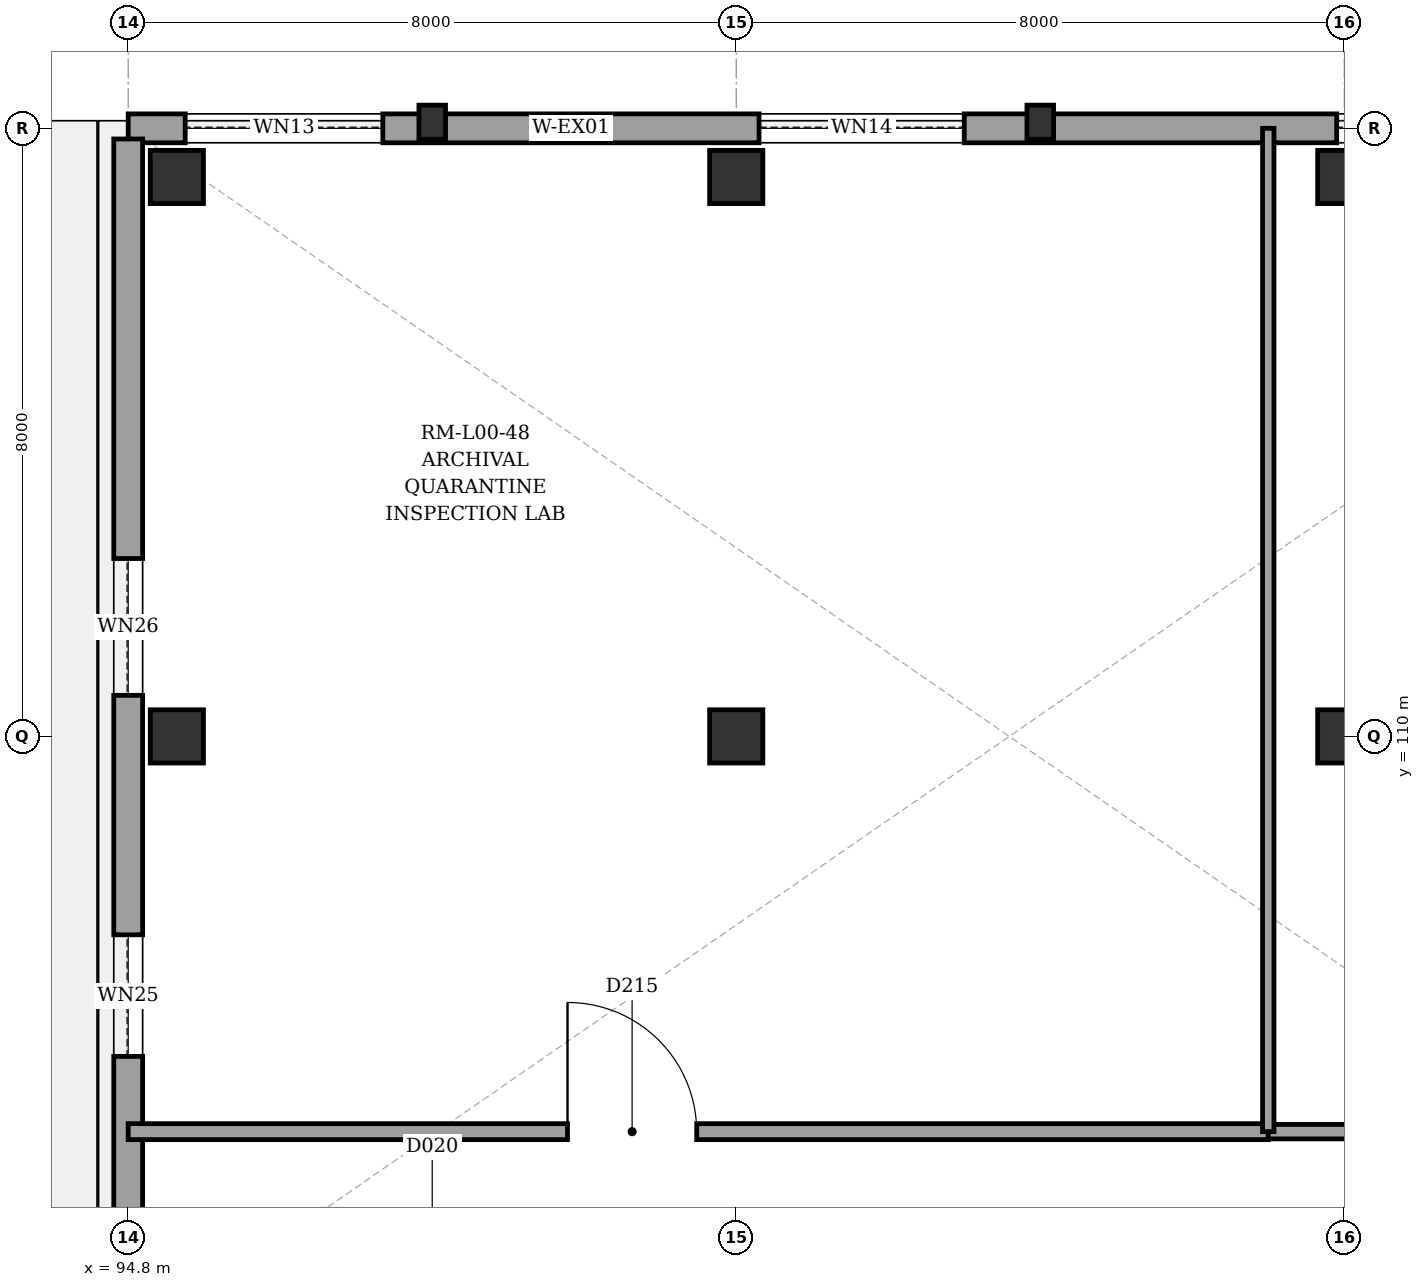
"""IFC4 building model, lengths in metres.
Left out: names, types, materials, properties, quantities, classifications, styles, units other than length and angle.
Written with IfcOpenShell. Run it as: python <this file> out.ifc"""

import sys

from ifc_helpers import new_model, si_unit, direction, frame, frame_2d, origin, origin_2d, place, context, subcontext, project, spatial, rectangle, extrude, element, fill, save


model = new_model("IFC4")
c1 = context("Model", 3, precision=1e-05, world=origin(), true_north=direction((0.0, 1.0)))
c2 = subcontext(c1, "Body", "Model", "MODEL_VIEW")
j1 = project(units=[si_unit("LENGTHUNIT", "METRE"), si_unit("PLANEANGLEUNIT", "RADIAN")], contexts=[c1])
p1 = place(None, origin())
s1 = spatial("IfcSite", under=j1, at=p1, CompositionType="ELEMENT")
p2 = place(p1, origin())
s2 = spatial("IfcBuilding", under=s1, at=p2, CompositionType="ELEMENT")
p3 = place(p2, origin())
s3 = spatial("IfcBuildingStorey", under=s2, at=p3, CompositionType="ELEMENT", Elevation=0.0)
for number, where, z_axis, x_axis in (
    (1, (95.44, 110.0, 0.0), (0.0, 0.0, 1.0), (1.0, 0.0, 0.0)),
    (2, (95.44, 117.36, 0.0), (0.0, 0.0, 1.0), (1.0, 0.0, 0.0)),
    (3, (102.8, 110.0, 0.0), (0.0, 0.0, 1.0), (1.0, 0.0, 0.0)),
    (4, (102.8, 117.36, 0.0), (0.0, 0.0, 1.0), (1.0, 0.0, 0.0)),
    (5, (110.8, 110.0, 0.0), (0.0, 0.0, 1.0), (1.0, 0.0, 0.0)),
    (6, (110.8, 117.36, 0.0), (0.0, 0.0, 1.0), (1.0, 0.0, 0.0)),
):
    element("IfcColumn", number, at=place(p3, frame(where, z_axis=z_axis, x_axis=x_axis)), inside=s3, PredefinedType="COLUMN", context=c2, shape_type="SweptSolid", body=[
        extrude(rectangle(XDim=0.7, YDim=0.7, at=origin_2d()), origin(), (0.0, 0.0, 1.0), 5.4),
    ])
for number, where, z_axis, x_axis in (
    (7, (98.8, 118.08, 0.0), (0.0, 0.0, 1.0), (0.0, 1.0, 0.0)),
    (8, (106.8, 118.08, 0.0), (0.0, 0.0, 1.0), (0.0, 1.0, 0.0)),
):
    element("IfcColumn", number, at=place(p3, frame(where, z_axis=z_axis, x_axis=x_axis)), inside=s3, PredefinedType="PILASTER", context=c2, shape_type="SweptSolid", body=[
        extrude(rectangle(XDim=0.35, YDim=0.45, at=origin_2d()), origin(), (0.0, 0.0, 1.0), 5.4),
    ])
p4 = place(p3, frame((94.8, 118.0, 0.0), z_axis=(0.0, 0.0, 1.0), x_axis=(1.0, 0.0, 0.0)))
e9 = element("IfcWall", 9, at=p4, inside=s3, PredefinedType="SOLIDWALL", context=c2, shape_type="SweptSolid", body=[
    extrude(rectangle(XDim=44.795, YDim=0.38, at=frame_2d((22.397, 0.0))), origin(), (0.0, 0.0, 1.0), 5.12),
])
p5 = place(p4, frame((0.75, 0.0, 0.9)))
e10 = element("IfcOpeningElement", 10, at=p5, cuts=e9, PredefinedType="OPENING", context=c2, shape_type="SweptSolid", body=[
    extrude(rectangle(XDim=2.6, YDim=2.35, at=frame_2d((1.3, 1.175))), frame((0.0, 0.2, 0.0), z_axis=(0.0, -1.0, 0.0), x_axis=(1.0, 0.0, 0.0)), (0.0, 0.0, 1.0), 0.4),
])
p6 = place(p4, frame((8.3, 0.0, 0.9)))
e11 = element("IfcOpeningElement", 11, at=p6, cuts=e9, PredefinedType="OPENING", context=c2, shape_type="SweptSolid", body=[
    extrude(rectangle(XDim=2.7, YDim=2.35, at=frame_2d((1.35, 1.175))), frame((0.0, 0.2, 0.0), z_axis=(0.0, -1.0, 0.0), x_axis=(1.0, 0.0, 0.0)), (0.0, 0.0, 1.0), 0.4),
])
p7 = place(p4, frame((15.9, 0.0, 0.9)))
e12 = element("IfcOpeningElement", 12, at=p7, cuts=e9, PredefinedType="OPENING", context=c2, shape_type="SweptSolid", body=[
    extrude(rectangle(XDim=2.8, YDim=2.4, at=frame_2d((1.4, 1.2))), frame((0.0, 0.2, 0.0), z_axis=(0.0, -1.0, 0.0), x_axis=(1.0, 0.0, 0.0)), (0.0, 0.0, 1.0), 0.4),
])
p8 = place(p4, frame((22.75, 0.0, 0.9)))
e13 = element("IfcOpeningElement", 13, at=p8, cuts=e9, PredefinedType="OPENING", context=c2, shape_type="SweptSolid", body=[
    extrude(rectangle(XDim=2.9, YDim=2.4, at=frame_2d((1.45, 1.2))), frame((0.0, 0.2, 0.0), z_axis=(0.0, -1.0, 0.0), x_axis=(1.0, 0.0, 0.0)), (0.0, 0.0, 1.0), 0.4),
])
p9 = place(p4, frame((30.35, 0.0, 0.9)))
e14 = element("IfcOpeningElement", 14, at=p9, cuts=e9, PredefinedType="OPENING", context=c2, shape_type="SweptSolid", body=[
    extrude(rectangle(XDim=3.0, YDim=2.45, at=frame_2d((1.5, 1.225))), frame((0.0, 0.2, 0.0), z_axis=(0.0, -1.0, 0.0), x_axis=(1.0, 0.0, 0.0)), (0.0, 0.0, 1.0), 0.4),
])
p10 = place(p4, frame((36.45, 0.0, 0.9)))
e15 = element("IfcOpeningElement", 15, at=p10, cuts=e9, PredefinedType="OPENING", context=c2, shape_type="SweptSolid", body=[
    extrude(rectangle(XDim=3.1, YDim=2.45, at=frame_2d((1.55, 1.225))), frame((0.0, 0.2, 0.0), z_axis=(0.0, -1.0, 0.0), x_axis=(1.0, 0.0, 0.0)), (0.0, 0.0, 1.0), 0.4),
])
p11 = place(p3, frame((94.8, 102.14, 0.0), z_axis=(0.0, 0.0, 1.0), x_axis=(0.0, 1.0, 0.0)))
e16 = element("IfcWall", 16, at=p11, inside=s3, PredefinedType="SOLIDWALL", context=c2, shape_type="SweptSolid", body=[
    extrude(rectangle(XDim=15.72, YDim=0.38, at=frame_2d((7.86, 0.0))), origin(), (0.0, 0.0, 1.0), 5.12),
])
p12 = place(p11, frame((3.65, 0.0, 0.9)))
e17 = element("IfcOpeningElement", 17, at=p12, cuts=e16, PredefinedType="OPENING", context=c2, shape_type="SweptSolid", body=[
    extrude(rectangle(XDim=1.6, YDim=1.65, at=frame_2d((0.8, 0.825))), frame((0.0, 0.2, 0.0), z_axis=(0.0, -1.0, 0.0), x_axis=(1.0, 0.0, 0.0)), (0.0, 0.0, 1.0), 0.4),
])
p13 = place(p11, frame((8.4, 0.0, 0.9)))
e18 = element("IfcOpeningElement", 18, at=p13, cuts=e16, PredefinedType="OPENING", context=c2, shape_type="SweptSolid", body=[
    extrude(rectangle(XDim=1.8, YDim=1.65, at=frame_2d((0.9, 0.825))), frame((0.0, 0.2, 0.0), z_axis=(0.0, -1.0, 0.0), x_axis=(1.0, 0.0, 0.0)), (0.0, 0.0, 1.0), 0.4),
])
p14 = place(p3, frame((94.8, 104.8, 0.0), z_axis=(0.0, 0.0, 1.0), x_axis=(1.0, 0.0, 0.0)))
e19 = element("IfcWall", 19, at=p14, inside=s3, PredefinedType="PARTITIONING", context=c2, shape_type="SweptSolid", body=[
    extrude(rectangle(XDim=15.0, YDim=0.21, at=frame_2d((7.5, 0.0))), origin(), (0.0, 0.0, 1.0), 5.12),
])
p15 = place(p14, frame((5.78, 0.0, 0.0)))
e20 = element("IfcOpeningElement", 20, at=p15, cuts=e19, PredefinedType="OPENING", context=c2, shape_type="SweptSolid", body=[
    extrude(rectangle(XDim=1.7, YDim=2.3, at=frame_2d((0.85, 1.15))), frame((0.0, 0.115, 0.0), z_axis=(0.0, -1.0, 0.0), x_axis=(1.0, 0.0, 0.0)), (0.0, 0.0, 1.0), 0.23),
])
p16 = place(p3, frame((109.8, 104.8, 0.0), z_axis=(0.0, 0.0, 1.0), x_axis=(1.0, 0.0, 0.0)))
e21 = element("IfcWall", 21, at=p16, inside=s3, PredefinedType="PARTITIONING", context=c2, shape_type="SweptSolid", body=[
    extrude(rectangle(XDim=15.0, YDim=0.19, at=frame_2d((7.5, 0.0))), origin(), (0.0, 0.0, 1.0), 5.12),
])
p17 = place(p16, frame((6.625, 0.0, 0.0)))
e22 = element("IfcOpeningElement", 22, at=p17, cuts=e21, PredefinedType="OPENING", context=c2, shape_type="SweptSolid", body=[
    extrude(rectangle(XDim=1.75, YDim=2.35, at=frame_2d((0.875, 1.175))), frame((0.0, 0.105, 0.0), z_axis=(0.0, -1.0, 0.0), x_axis=(1.0, 0.0, 0.0)), (0.0, 0.0, 1.0), 0.21),
])
p18 = place(p3, frame((109.8, 118.0, 0.0), z_axis=(0.0, 0.0, 1.0), x_axis=(0.0, -1.0, 0.0)))
e23 = element("IfcWall", 23, at=p18, inside=s3, PredefinedType="PARTITIONING", context=c2, shape_type="SweptSolid", body=[
    extrude(rectangle(XDim=13.2, YDim=0.15, at=frame_2d((6.6, 0.0))), origin(), (0.0, 0.0, 1.0), 5.12),
])
p19 = place(p5, origin())
e24 = element("IfcWindow", 24, at=p19, inside=s3, PartitioningType="SINGLE_PANEL", PredefinedType="WINDOW", context=c2, shape_type="SweptSolid", body=[
    extrude(rectangle(XDim=2.6, YDim=2.35, at=frame_2d((1.3, 1.175))), frame((0.0, 0.03, 0.0), z_axis=(0.0, -1.0, 0.0), x_axis=(1.0, 0.0, 0.0)), (0.0, 0.0, 1.0), 0.06),
])
fill(e10, e24)
p20 = place(p6, origin())
e25 = element("IfcWindow", 25, at=p20, inside=s3, PartitioningType="SINGLE_PANEL", PredefinedType="WINDOW", context=c2, shape_type="SweptSolid", body=[
    extrude(rectangle(XDim=2.7, YDim=2.35, at=frame_2d((1.35, 1.175))), frame((0.0, 0.03, 0.0), z_axis=(0.0, -1.0, 0.0), x_axis=(1.0, 0.0, 0.0)), (0.0, 0.0, 1.0), 0.06),
])
fill(e11, e25)
p21 = place(p7, origin())
e26 = element("IfcWindow", 26, at=p21, inside=s3, PartitioningType="SINGLE_PANEL", PredefinedType="WINDOW", context=c2, shape_type="SweptSolid", body=[
    extrude(rectangle(XDim=2.8, YDim=2.4, at=frame_2d((1.4, 1.2))), frame((0.0, 0.03, 0.0), z_axis=(0.0, -1.0, 0.0), x_axis=(1.0, 0.0, 0.0)), (0.0, 0.0, 1.0), 0.06),
])
fill(e12, e26)
p22 = place(p12, origin())
e27 = element("IfcWindow", 27, at=p22, inside=s3, PartitioningType="SINGLE_PANEL", PredefinedType="WINDOW", context=c2, shape_type="SweptSolid", body=[
    extrude(rectangle(XDim=1.6, YDim=1.65, at=frame_2d((0.8, 0.825))), frame((0.0, 0.03, 0.0), z_axis=(0.0, -1.0, 0.0), x_axis=(1.0, 0.0, 0.0)), (0.0, 0.0, 1.0), 0.06),
])
fill(e17, e27)
p23 = place(p13, origin())
e28 = element("IfcWindow", 28, at=p23, inside=s3, PartitioningType="SINGLE_PANEL", PredefinedType="WINDOW", context=c2, shape_type="SweptSolid", body=[
    extrude(rectangle(XDim=1.8, YDim=1.65, at=frame_2d((0.9, 0.825))), frame((0.0, 0.03, 0.0), z_axis=(0.0, -1.0, 0.0), x_axis=(1.0, 0.0, 0.0)), (0.0, 0.0, 1.0), 0.06),
])
fill(e18, e28)
p24 = place(p15, origin())
e29 = element("IfcDoor", 29, at=p24, inside=s3, OperationType="SINGLE_SWING_LEFT", PredefinedType="DOOR", context=c2, shape_type="SweptSolid", body=[
    extrude(rectangle(XDim=1.7, YDim=2.3, at=frame_2d((0.85, 1.15))), frame((0.0, 0.025, 0.0), z_axis=(0.0, -1.0, 0.0), x_axis=(1.0, 0.0, 0.0)), (0.0, 0.0, 1.0), 0.05),
])
fill(e20, e29)
save(model, sys.argv[1])
